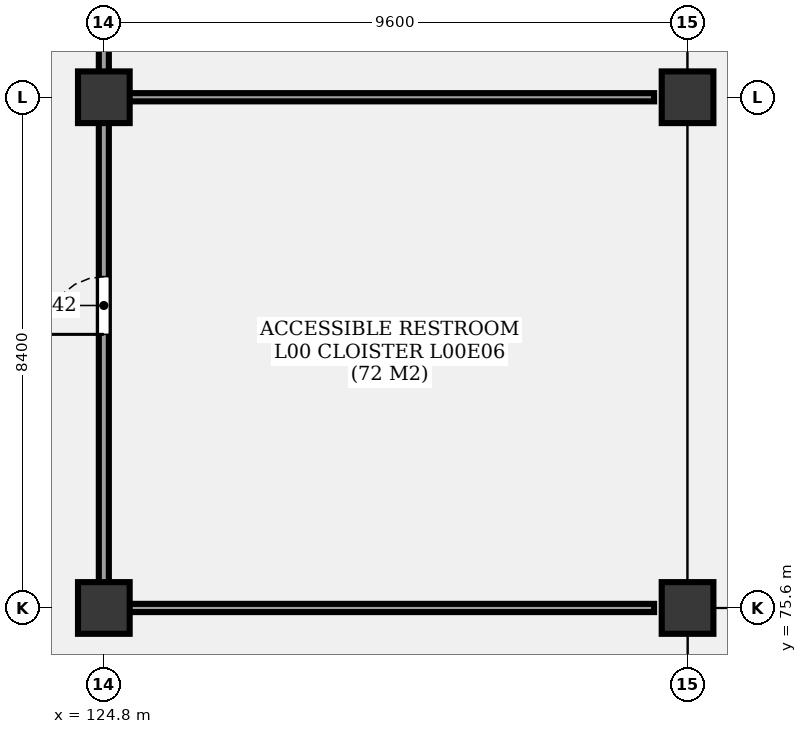
"""IFC4 building model, lengths in metres.
Left out: names, types, materials, properties, quantities, classifications, styles, units other than length and angle.
Written with IfcOpenShell. Run it as: python <this file> out.ifc"""

import sys

from ifc_helpers import new_model, si_unit, direction, frame, frame_2d, origin, origin_2d, place, context, subcontext, project, spatial, rectangle, extrude, element, fill, save


model = new_model("IFC4")
c1 = context("Model", 3, precision=1e-05, world=origin(), true_north=direction((0.0, 1.0)))
c2 = subcontext(c1, "Body", "Model", "MODEL_VIEW")
j1 = project(units=[si_unit("LENGTHUNIT", "METRE"), si_unit("PLANEANGLEUNIT", "RADIAN")], contexts=[c1])
p1 = place(None, origin())
s1 = spatial("IfcSite", under=j1, at=p1, CompositionType="ELEMENT")
p2 = place(p1, origin())
s2 = spatial("IfcBuilding", under=s1, at=p2, CompositionType="ELEMENT")
p3 = place(p2, origin())
s3 = spatial("IfcBuildingStorey", under=s2, at=p3, CompositionType="ELEMENT", Elevation=0.0)
for number, where, z_axis, x_axis in (
    (1, (124.8, 75.6, -0.35), (0.0, 0.0, 1.0), (1.0, 0.0, 0.0)),
    (2, (124.8, 84.0, -0.35), (0.0, 0.0, 1.0), (1.0, 0.0, 0.0)),
    (3, (134.4, 75.6, -0.35), (0.0, 0.0, 1.0), (1.0, 0.0, 0.0)),
    (4, (134.4, 84.0, -0.35), (0.0, 0.0, 1.0), (1.0, 0.0, 0.0)),
):
    element("IfcColumn", number, at=place(p3, frame(where, z_axis=z_axis, x_axis=x_axis)), inside=s3, PredefinedType="COLUMN", context=c2, shape_type="SweptSolid", body=[
        extrude(rectangle(XDim=0.85, YDim=0.85, at=origin_2d()), origin(), (0.0, 0.0, 1.0), 5.45),
    ])
p4 = place(p3, frame((124.8, 75.85, 0.0), z_axis=(0.0, 0.0, 1.0), x_axis=(0.0, 1.0, 0.0)))
e5 = element("IfcWall", 5, at=p4, inside=s3, PredefinedType="PARTITIONING", context=c2, shape_type="SweptSolid", body=[
    extrude(rectangle(XDim=7.9, YDim=0.165, at=frame_2d((3.95, 0.0))), origin(), (0.0, 0.0, 1.0), 3.98),
])
p5 = place(p4, frame((4.25, 0.0, 0.0)))
e6 = element("IfcOpeningElement", 6, at=p5, cuts=e5, PredefinedType="OPENING", context=c2, shape_type="SweptSolid", body=[
    extrude(rectangle(XDim=0.95, YDim=2.1, at=frame_2d((0.475, 1.05))), frame((0.0, 0.093, 0.0), z_axis=(0.0, -1.0, 0.0), x_axis=(1.0, 0.0, 0.0)), (0.0, 0.0, 1.0), 0.185),
])
p6 = place(p3, frame((124.95, 75.6, 0.0), z_axis=(0.0, 0.0, 1.0), x_axis=(1.0, 0.0, 0.0)))
e7 = element("IfcWall", 7, at=p6, inside=s3, PredefinedType="PARTITIONING", context=c2, shape_type="SweptSolid", body=[
    extrude(rectangle(XDim=8.9, YDim=0.135, at=frame_2d((4.45, 0.0))), origin(), (0.0, 0.0, 1.0), 3.98),
])
p7 = place(p3, frame((124.8, 84.25, 0.0), z_axis=(0.0, 0.0, 1.0), x_axis=(0.0, 1.0, 0.0)))
e8 = element("IfcWall", 8, at=p7, inside=s3, PredefinedType="PARTITIONING", context=c2, shape_type="SweptSolid", body=[
    extrude(rectangle(XDim=7.9, YDim=0.165, at=frame_2d((3.95, 0.0))), origin(), (0.0, 0.0, 1.0), 3.98),
])
p8 = place(p7, frame((4.25, 0.0, 0.0)))
e9 = element("IfcOpeningElement", 9, at=p8, cuts=e8, PredefinedType="OPENING", context=c2, shape_type="SweptSolid", body=[
    extrude(rectangle(XDim=1.0, YDim=2.2, at=frame_2d((0.5, 1.1))), frame((0.0, 0.093, 0.0), z_axis=(0.0, -1.0, 0.0), x_axis=(1.0, 0.0, 0.0)), (0.0, 0.0, 1.0), 0.185),
])
p9 = place(p3, frame((124.95, 84.0, 0.0), z_axis=(0.0, 0.0, 1.0), x_axis=(1.0, 0.0, 0.0)))
e10 = element("IfcWall", 10, at=p9, inside=s3, PredefinedType="PARTITIONING", context=c2, shape_type="SweptSolid", body=[
    extrude(rectangle(XDim=8.9, YDim=0.135, at=frame_2d((4.45, 0.0))), origin(), (0.0, 0.0, 1.0), 3.98),
])
p10 = place(p5, origin())
e11 = element("IfcDoor", 11, at=p10, inside=s3, OperationType="SINGLE_SWING_LEFT", PredefinedType="DOOR", context=c2, shape_type="SweptSolid", body=[
    extrude(rectangle(XDim=0.95, YDim=2.1, at=frame_2d((0.475, 1.05))), frame((0.0, 0.025, 0.0), z_axis=(0.0, -1.0, 0.0), x_axis=(1.0, 0.0, 0.0)), (0.0, 0.0, 1.0), 0.05),
])
fill(e6, e11)
save(model, sys.argv[1])
